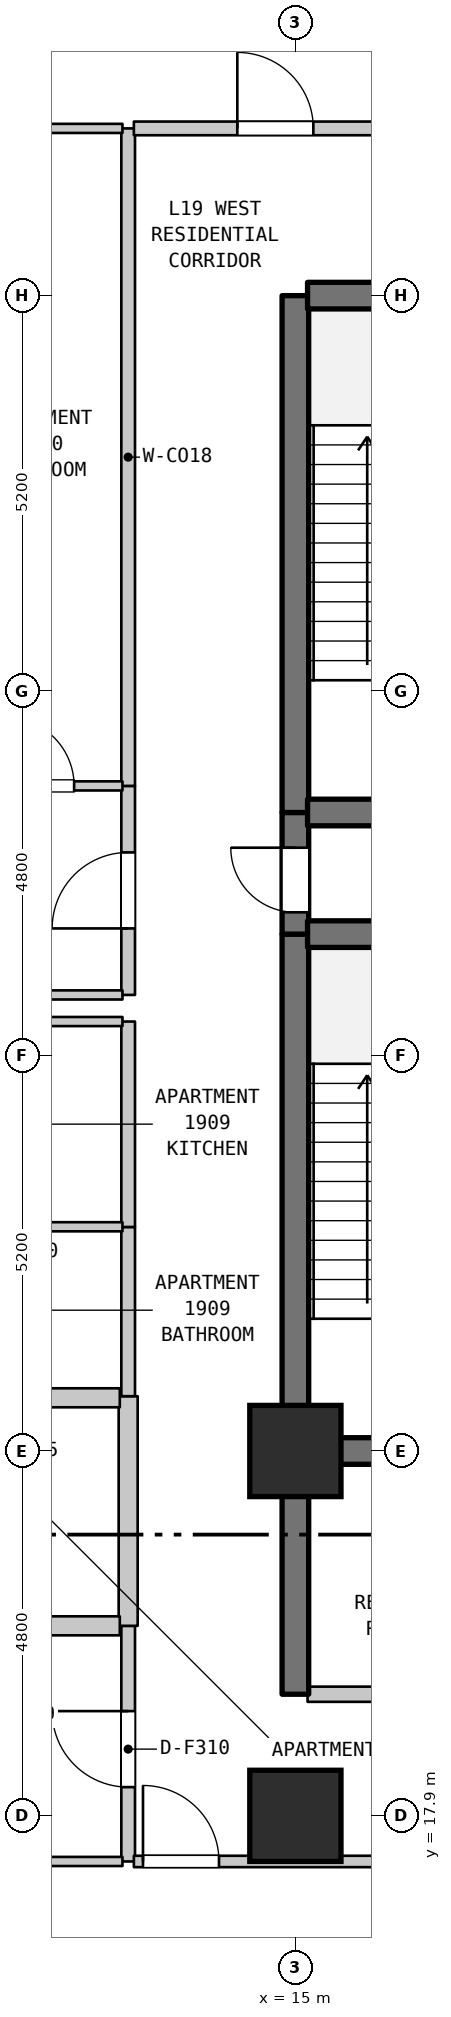
"""IFC4 building model, lengths in metres.
Left out: names, types, materials, properties, quantities, classifications, styles, units other than length and angle.
Written with IfcOpenShell. Run it as: python <this file> out.ifc"""

import sys

from ifc_helpers import new_model, si_unit, direction, frame, frame_2d, origin, origin_2d, place, context, subcontext, project, spatial, rectangle, extrude, element, fill, save


model = new_model("IFC4")
c1 = context("Model", 3, precision=1e-05, world=origin(), true_north=direction((0.0, 1.0)))
c2 = subcontext(c1, "Body", "Model", "MODEL_VIEW")
j1 = project(units=[si_unit("LENGTHUNIT", "METRE"), si_unit("PLANEANGLEUNIT", "RADIAN")], contexts=[c1])
p1 = place(None, origin())
s1 = spatial("IfcSite", under=j1, at=p1, CompositionType="ELEMENT")
p2 = place(p1, origin())
s2 = spatial("IfcBuilding", under=s1, at=p2, CompositionType="ELEMENT")
p3 = place(p2, frame((0.0, 0.0, 81.2)))
s3 = spatial("IfcBuildingStorey", under=s2, at=p3, CompositionType="ELEMENT", Elevation=81.2)
for number, where, z_axis, x_axis in (
    (1, (15.0, 17.9, 0.0), (0.0, 0.0, 1.0), (1.0, 0.0, 0.0)),
    (2, (15.0, 22.7, 0.0), (0.0, 0.0, 1.0), (1.0, 0.0, 0.0)),
):
    element("IfcColumn", number, at=place(p3, frame(where, z_axis=z_axis, x_axis=x_axis)), inside=s3, PredefinedType="COLUMN", context=c2, shape_type="SweptSolid", body=[
        extrude(rectangle(XDim=1.2, YDim=1.2, at=origin_2d()), origin(), (0.0, 0.0, 1.0), 5.2),
    ])
p4 = place(p3, frame((12.8, 17.3, 0.0), z_axis=(0.0, 0.0, 1.0), x_axis=(0.0, 1.0, 0.0)))
e3 = element("IfcWall", 3, at=p4, inside=s3, PredefinedType="STANDARD", context=c2, shape_type="SweptSolid", body=[
    extrude(rectangle(XDim=3.1, YDim=0.18, at=frame_2d((1.55, 0.0))), origin(), (0.0, 0.0, 1.0), 4.885),
])
p5 = place(p4, frame((0.978, 0.0, 0.0)))
e4 = element("IfcOpeningElement", 4, at=p5, cuts=e3, PredefinedType="OPENING", context=c2, shape_type="SweptSolid", body=[
    extrude(rectangle(XDim=1.0, YDim=2.15, at=frame_2d((0.5, 1.075))), frame((0.0, 0.1, 0.0), z_axis=(0.0, -1.0, 0.0), x_axis=(1.0, 0.0, 0.0)), (0.0, 0.0, 1.0), 0.2),
])
p6 = place(p3, frame((12.8, 20.4, 0.0), z_axis=(0.0, 0.0, 1.0), x_axis=(0.0, 1.0, 0.0)))
e5 = element("IfcWall", 5, at=p6, inside=s3, PredefinedType="STANDARD", context=c2, shape_type="SweptSolid", body=[
    extrude(rectangle(XDim=3.021, YDim=0.25, at=frame_2d((1.51, 0.0))), origin(), (0.0, 0.0, 1.0), 4.885),
])
p7 = place(p3, frame((12.8, 23.421, 0.0), z_axis=(0.0, 0.0, 1.0), x_axis=(0.0, 1.0, 0.0)))
e6 = element("IfcWall", 6, at=p7, inside=s3, PredefinedType="STANDARD", context=c2, shape_type="SweptSolid", body=[
    extrude(rectangle(XDim=2.226, YDim=0.18, at=frame_2d((1.113, 0.0))), origin(), (0.0, 0.0, 1.0), 4.885),
])
p8 = place(p3, frame((12.8, 25.647, 0.0), z_axis=(0.0, 0.0, 1.0), x_axis=(0.0, 1.0, 0.0)))
e7 = element("IfcWall", 7, at=p8, inside=s3, PredefinedType="STANDARD", context=c2, shape_type="SweptSolid", body=[
    extrude(rectangle(XDim=2.703, YDim=0.18, at=frame_2d((1.352, 0.0))), origin(), (0.0, 0.0, 1.0), 4.885),
])
p9 = place(p3, frame((12.8, 28.7, 0.0), z_axis=(0.0, 0.0, 1.0), x_axis=(0.0, 1.0, 0.0)))
e8 = element("IfcWall", 8, at=p9, inside=s3, PredefinedType="STANDARD", context=c2, shape_type="SweptSolid", body=[
    extrude(rectangle(XDim=2.75, YDim=0.18, at=frame_2d((1.375, 0.0))), origin(), (0.0, 0.0, 1.0), 4.885),
])
p10 = place(p9, frame((0.875, 0.0, 0.0)))
e9 = element("IfcOpeningElement", 9, at=p10, cuts=e8, PredefinedType="OPENING", context=c2, shape_type="SweptSolid", body=[
    extrude(rectangle(XDim=1.0, YDim=2.15, at=frame_2d((0.5, 1.075))), frame((0.0, 0.1, 0.0), z_axis=(0.0, -1.0, 0.0), x_axis=(1.0, 0.0, 0.0)), (0.0, 0.0, 1.0), 0.2),
])
p11 = place(p3, frame((12.8, 31.45, 0.0), z_axis=(0.0, 0.0, 1.0), x_axis=(0.0, 1.0, 0.0)))
e10 = element("IfcWall", 10, at=p11, inside=s3, PredefinedType="STANDARD", context=c2, shape_type="SweptSolid", body=[
    extrude(rectangle(XDim=8.65, YDim=0.18, at=frame_2d((4.325, 0.0))), origin(), (0.0, 0.0, 1.0), 4.885),
])
p12 = place(p3, frame((15.0, 19.5, 0.0), z_axis=(0.0, 0.0, 1.0), x_axis=(0.0, 1.0, 0.0)))
e11 = element("IfcWall", 11, at=p12, inside=s3, PredefinedType="SHEAR", context=c2, shape_type="SweptSolid", body=[
    extrude(rectangle(XDim=3.2, YDim=0.35, at=frame_2d((1.6, 0.0))), origin(), (0.0, 0.0, 1.0), 4.885),
])
p13 = place(p3, frame((15.0, 22.7, 0.0), z_axis=(0.0, 0.0, 1.0), x_axis=(0.0, 1.0, 0.0)))
e12 = element("IfcWall", 12, at=p13, inside=s3, PredefinedType="SHEAR", context=c2, shape_type="SweptSolid", body=[
    extrude(rectangle(XDim=6.8, YDim=0.35, at=frame_2d((3.4, 0.0))), origin(), (0.0, 0.0, 1.0), 4.885),
])
p14 = place(p3, frame((15.0, 29.5, 0.0), z_axis=(0.0, 0.0, 1.0), x_axis=(0.0, 1.0, 0.0)))
e13 = element("IfcWall", 13, at=p14, inside=s3, PredefinedType="SHEAR", context=c2, shape_type="SweptSolid", body=[
    extrude(rectangle(XDim=1.6, YDim=0.35, at=frame_2d((0.8, 0.0))), origin(), (0.0, 0.0, 1.0), 4.885),
])
p15 = place(p14, frame((0.287, 0.0, 0.0)))
e14 = element("IfcOpeningElement", 14, at=p15, cuts=e13, PredefinedType="OPENING", context=c2, shape_type="SweptSolid", body=[
    extrude(rectangle(XDim=0.85, YDim=2.1, at=frame_2d((0.425, 1.05))), frame((0.0, 0.185, 0.0), z_axis=(0.0, -1.0, 0.0), x_axis=(1.0, 0.0, 0.0)), (0.0, 0.0, 1.0), 0.37),
])
p16 = place(p3, frame((15.0, 31.1, 0.0), z_axis=(0.0, 0.0, 1.0), x_axis=(0.0, 1.0, 0.0)))
e15 = element("IfcWall", 15, at=p16, inside=s3, PredefinedType="SHEAR", context=c2, shape_type="SweptSolid", body=[
    extrude(rectangle(XDim=6.8, YDim=0.35, at=frame_2d((3.4, 0.0))), origin(), (0.0, 0.0, 1.0), 4.885),
])
p17 = place(p3, frame((10.46, 17.3, 0.0), z_axis=(0.0, 0.0, 1.0), x_axis=(1.0, 0.0, 0.0)))
e16 = element("IfcWall", 16, at=p17, inside=s3, PredefinedType="PARTITIONING", context=c2, shape_type="SweptSolid", body=[
    extrude(rectangle(XDim=2.265, YDim=0.12, at=frame_2d((1.133, 0.0))), origin(), (0.0, 0.0, 1.0), 4.885),
])
p18 = place(p3, frame((12.875, 17.3, 0.0), z_axis=(0.0, 0.0, 1.0), x_axis=(1.0, 0.0, 0.0)))
e17 = element("IfcWall", 17, at=p18, inside=s3, PredefinedType="STANDARD", context=c2, shape_type="SweptSolid", body=[
    extrude(rectangle(XDim=3.78, YDim=0.15, at=frame_2d((1.89, 0.0))), origin(), (0.0, 0.0, 1.0), 4.885),
])
p19 = place(p18, frame((0.12, 0.0, 0.0)))
e18 = element("IfcOpeningElement", 18, at=p19, cuts=e17, PredefinedType="OPENING", context=c2, shape_type="SweptSolid", body=[
    extrude(rectangle(XDim=1.0, YDim=2.15, at=frame_2d((0.5, 1.075))), frame((0.0, 0.085, 0.0), z_axis=(0.0, -1.0, 0.0), x_axis=(1.0, 0.0, 0.0)), (0.0, 0.0, 1.0), 0.17),
])
p20 = place(p3, frame((15.16, 19.5, 0.0), z_axis=(0.0, 0.0, 1.0), x_axis=(1.0, 0.0, 0.0)))
e19 = element("IfcWall", 19, at=p20, inside=s3, PredefinedType="STANDARD", context=c2, shape_type="SweptSolid", body=[
    extrude(rectangle(XDim=3.68, YDim=0.2, at=frame_2d((1.84, 0.0))), origin(), (0.0, 0.0, 1.0), 4.885),
])
p21 = place(p20, frame((1.39, 0.0, 0.0)))
e20 = element("IfcOpeningElement", 20, at=p21, cuts=e19, PredefinedType="OPENING", context=c2, shape_type="SweptSolid", body=[
    extrude(rectangle(XDim=0.9, YDim=2.15, at=frame_2d((0.45, 1.075))), frame((0.0, 0.11, 0.0), z_axis=(0.0, -1.0, 0.0), x_axis=(1.0, 0.0, 0.0)), (0.0, 0.0, 1.0), 0.22),
])
p22 = place(p3, frame((10.66, 20.4, 0.0), z_axis=(0.0, 0.0, 1.0), x_axis=(1.0, 0.0, 0.0)))
e21 = element("IfcWall", 21, at=p22, inside=s3, PredefinedType="STANDARD", context=c2, shape_type="SweptSolid", body=[
    extrude(rectangle(XDim=2.03, YDim=0.25, at=frame_2d((1.015, 0.0))), origin(), (0.0, 0.0, 1.0), 4.885),
])
p23 = place(p3, frame((15.16, 22.7, 0.0), z_axis=(0.0, 0.0, 1.0), x_axis=(1.0, 0.0, 0.0)))
e22 = element("IfcWall", 22, at=p23, inside=s3, PredefinedType="SHEAR", context=c2, shape_type="SweptSolid", body=[
    extrude(rectangle(XDim=3.68, YDim=0.35, at=frame_2d((1.84, 0.0))), origin(), (0.0, 0.0, 1.0), 4.885),
])
p24 = place(p3, frame((10.66, 23.4, 0.0), z_axis=(0.0, 0.0, 1.0), x_axis=(1.0, 0.0, 0.0)))
e23 = element("IfcWall", 23, at=p24, inside=s3, PredefinedType="STANDARD", context=c2, shape_type="SweptSolid", body=[
    extrude(rectangle(XDim=2.03, YDim=0.25, at=frame_2d((1.015, 0.0))), origin(), (0.0, 0.0, 1.0), 4.885),
])
for number, where, z_axis, x_axis in (
    (24, (10.595, 25.65, 0.0), (0.0, 0.0, 1.0), (1.0, 0.0, 0.0)),
    (25, (10.595, 28.35, 0.0), (0.0, 0.0, 1.0), (1.0, 0.0, 0.0)),
):
    element("IfcWall", number, at=place(p3, frame(where, z_axis=z_axis, x_axis=x_axis)), inside=s3, PredefinedType="PARTITIONING", context=c2, shape_type="SweptSolid", body=[
        extrude(rectangle(XDim=2.13, YDim=0.12, at=frame_2d((1.065, 0.0))), origin(), (0.0, 0.0, 1.0), 4.885),
    ])
p25 = place(p3, frame((9.03, 28.7, 0.0), z_axis=(0.0, 0.0, 1.0), x_axis=(1.0, 0.0, 0.0)))
e26 = element("IfcWall", 26, at=p25, inside=s3, PredefinedType="PARTITIONING", context=c2, shape_type="SweptSolid", body=[
    extrude(rectangle(XDim=3.695, YDim=0.12, at=frame_2d((1.848, 0.0))), origin(), (0.0, 0.0, 1.0), 4.885),
])
for number, where, z_axis, x_axis in (
    (27, (15.16, 29.5, 0.0), (0.0, 0.0, 1.0), (1.0, 0.0, 0.0)),
    (28, (15.16, 31.1, 0.0), (0.0, 0.0, 1.0), (1.0, 0.0, 0.0)),
):
    element("IfcWall", number, at=place(p3, frame(where, z_axis=z_axis, x_axis=x_axis)), inside=s3, PredefinedType="SHEAR", context=c2, shape_type="SweptSolid", body=[
        extrude(rectangle(XDim=3.68, YDim=0.35, at=frame_2d((1.84, 0.0))), origin(), (0.0, 0.0, 1.0), 4.885),
    ])
p26 = place(p3, frame((10.523, 31.45, 0.0), z_axis=(0.0, 0.0, 1.0), x_axis=(1.0, 0.0, 0.0)))
e29 = element("IfcWall", 29, at=p26, inside=s3, PredefinedType="PARTITIONING", context=c2, shape_type="SweptSolid", body=[
    extrude(rectangle(XDim=2.202, YDim=0.12, at=frame_2d((1.101, 0.0))), origin(), (0.0, 0.0, 1.0), 4.885),
])
p27 = place(p26, frame((0.666, 0.0, 0.0)))
e30 = element("IfcOpeningElement", 30, at=p27, cuts=e29, PredefinedType="OPENING", context=c2, shape_type="SweptSolid", body=[
    extrude(rectangle(XDim=0.9, YDim=2.1, at=frame_2d((0.45, 1.05))), frame((0.0, 0.07, 0.0), z_axis=(0.0, -1.0, 0.0), x_axis=(1.0, 0.0, 0.0)), (0.0, 0.0, 1.0), 0.14),
])
p28 = place(p3, frame((15.16, 37.9, 0.0), z_axis=(0.0, 0.0, 1.0), x_axis=(1.0, 0.0, 0.0)))
e31 = element("IfcWall", 31, at=p28, inside=s3, PredefinedType="SHEAR", context=c2, shape_type="SweptSolid", body=[
    extrude(rectangle(XDim=3.68, YDim=0.35, at=frame_2d((1.84, 0.0))), origin(), (0.0, 0.0, 1.0), 4.885),
])
p29 = place(p3, frame((9.702, 40.1, 0.0), z_axis=(0.0, 0.0, 1.0), x_axis=(1.0, 0.0, 0.0)))
e32 = element("IfcWall", 32, at=p29, inside=s3, PredefinedType="PARTITIONING", context=c2, shape_type="SweptSolid", body=[
    extrude(rectangle(XDim=3.023, YDim=0.12, at=frame_2d((1.512, 0.0))), origin(), (0.0, 0.0, 1.0), 4.885),
])
p30 = place(p3, frame((12.875, 40.1, 0.0), z_axis=(0.0, 0.0, 1.0), x_axis=(1.0, 0.0, 0.0)))
e33 = element("IfcWall", 33, at=p30, inside=s3, PredefinedType="STANDARD", context=c2, shape_type="SweptSolid", body=[
    extrude(rectangle(XDim=3.9, YDim=0.18, at=frame_2d((1.95, 0.0))), origin(), (0.0, 0.0, 1.0), 4.885),
])
p31 = place(p30, frame((1.361, 0.0, 0.0)))
e34 = element("IfcOpeningElement", 34, at=p31, cuts=e33, PredefinedType="OPENING", context=c2, shape_type="SweptSolid", body=[
    extrude(rectangle(XDim=1.0, YDim=2.15, at=frame_2d((0.5, 1.075))), frame((0.0, 0.1, 0.0), z_axis=(0.0, -1.0, 0.0), x_axis=(1.0, 0.0, 0.0)), (0.0, 0.0, 1.0), 0.2),
])
p32 = place(p5, origin())
e35 = element("IfcDoor", 35, at=p32, inside=s3, OperationType="SINGLE_SWING_RIGHT", PredefinedType="DOOR", context=c2, shape_type="SweptSolid", body=[
    extrude(rectangle(XDim=1.0, YDim=2.15, at=frame_2d((0.5, 1.075))), frame((0.0, 0.025, 0.0), z_axis=(0.0, -1.0, 0.0), x_axis=(1.0, 0.0, 0.0)), (0.0, 0.0, 1.0), 0.05),
])
fill(e4, e35)
p33 = place(p10, origin())
e36 = element("IfcDoor", 36, at=p33, inside=s3, OperationType="SINGLE_SWING_LEFT", PredefinedType="DOOR", context=c2, shape_type="SweptSolid", body=[
    extrude(rectangle(XDim=1.0, YDim=2.15, at=frame_2d((0.5, 1.075))), frame((0.0, 0.025, 0.0), z_axis=(0.0, -1.0, 0.0), x_axis=(1.0, 0.0, 0.0)), (0.0, 0.0, 1.0), 0.05),
])
fill(e9, e36)
p34 = place(p15, origin())
e37 = element("IfcDoor", 37, at=p34, inside=s3, OperationType="SINGLE_SWING_RIGHT", PredefinedType="DOOR", context=c2, shape_type="SweptSolid", body=[
    extrude(rectangle(XDim=0.85, YDim=2.1, at=frame_2d((0.425, 1.05))), frame((0.0, 0.025, 0.0), z_axis=(0.0, -1.0, 0.0), x_axis=(1.0, 0.0, 0.0)), (0.0, 0.0, 1.0), 0.05),
])
fill(e14, e37)
p35 = place(p19, origin())
e38 = element("IfcDoor", 38, at=p35, inside=s3, OperationType="SINGLE_SWING_LEFT", PredefinedType="DOOR", context=c2, shape_type="SweptSolid", body=[
    extrude(rectangle(XDim=1.0, YDim=2.15, at=frame_2d((0.5, 1.075))), frame((0.0, 0.025, 0.0), z_axis=(0.0, -1.0, 0.0), x_axis=(1.0, 0.0, 0.0)), (0.0, 0.0, 1.0), 0.05),
])
fill(e18, e38)
p36 = place(p27, origin())
e39 = element("IfcDoor", 39, at=p36, inside=s3, OperationType="SINGLE_SWING_LEFT", PredefinedType="DOOR", context=c2, shape_type="SweptSolid", body=[
    extrude(rectangle(XDim=0.9, YDim=2.1, at=frame_2d((0.45, 1.05))), frame((0.0, 0.025, 0.0), z_axis=(0.0, -1.0, 0.0), x_axis=(1.0, 0.0, 0.0)), (0.0, 0.0, 1.0), 0.05),
])
fill(e30, e39)
p37 = place(p31, origin())
e40 = element("IfcDoor", 40, at=p37, inside=s3, OperationType="SINGLE_SWING_LEFT", PredefinedType="DOOR", context=c2, shape_type="SweptSolid", body=[
    extrude(rectangle(XDim=1.0, YDim=2.15, at=frame_2d((0.5, 1.075))), frame((0.0, 0.025, 0.0), z_axis=(0.0, -1.0, 0.0), x_axis=(1.0, 0.0, 0.0)), (0.0, 0.0, 1.0), 0.05),
])
fill(e34, e40)
save(model, sys.argv[1])
